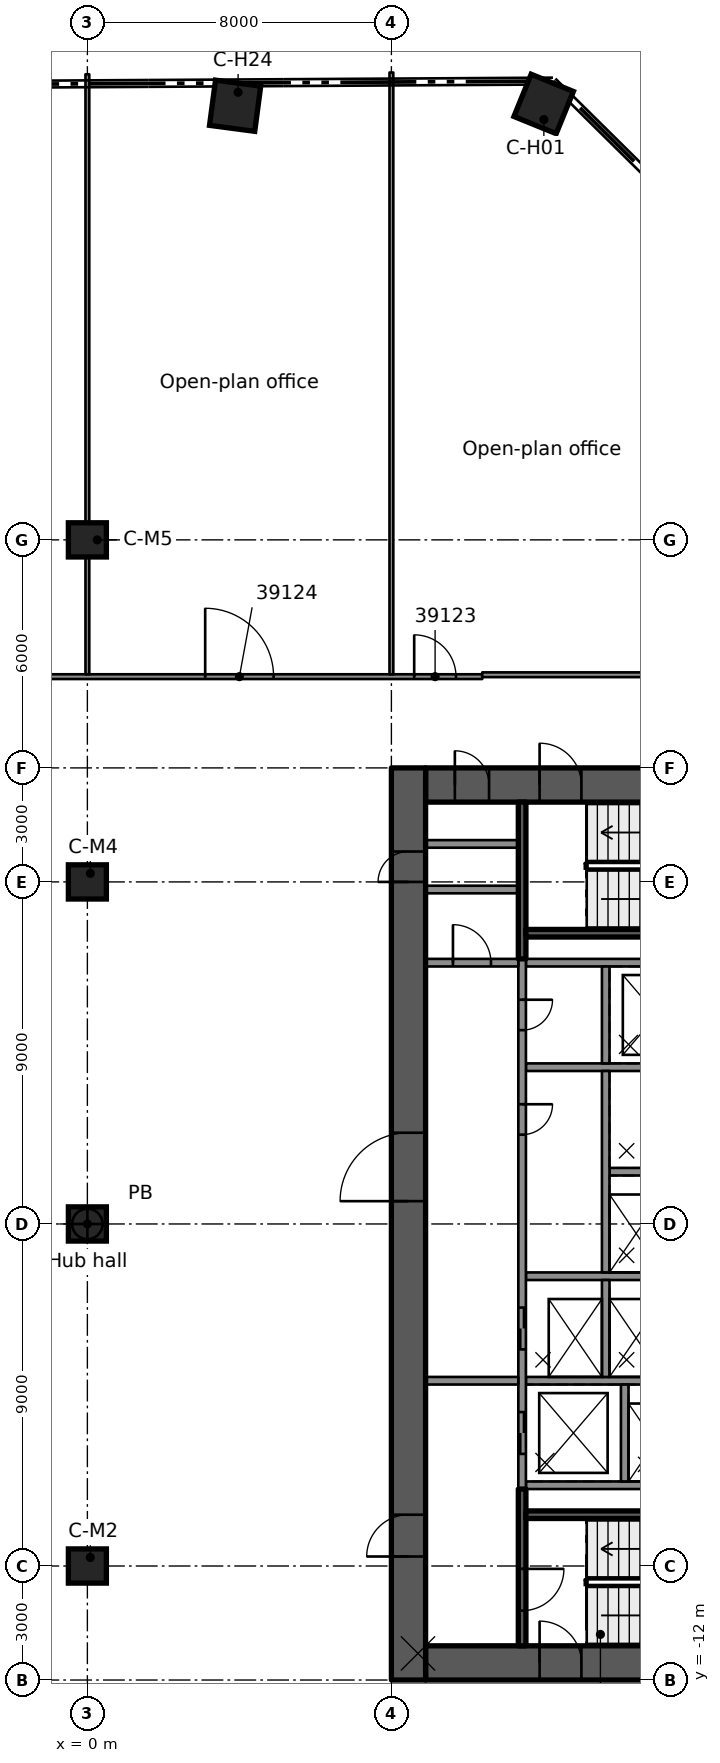
"""IFC4 building model, lengths in metres.
Left out: names, types, materials, properties, quantities, classifications, styles, units other than length and angle.
Written with IfcOpenShell. Run it as: python <this file> out.ifc"""

import sys

from ifc_helpers import new_model, si_unit, direction, frame, frame_2d, origin, origin_2d, place, context, subcontext, project, spatial, rectangle, extrude, element, fill, save


model = new_model("IFC4")
c1 = context("Model", 3, precision=1e-05, world=origin(), true_north=direction((0.0, 1.0)))
c2 = subcontext(c1, "Body", "Model", "MODEL_VIEW")
j1 = project(units=[si_unit("LENGTHUNIT", "METRE"), si_unit("PLANEANGLEUNIT", "RADIAN")], contexts=[c1])
p1 = place(None, origin())
s1 = spatial("IfcSite", under=j1, at=p1, CompositionType="ELEMENT")
p2 = place(p1, origin())
s2 = spatial("IfcBuilding", under=s1, at=p2, CompositionType="ELEMENT")
p3 = place(p2, frame((0.0, 0.0, 192.1)))
s3 = spatial("IfcBuildingStorey", under=s2, at=p3, CompositionType="ELEMENT", Elevation=192.1)
p4 = place(p3, frame((8.9, 11.55, 0.0), z_axis=(0.0, 0.0, 1.0), x_axis=(1.0, 0.0, 0.0)))
e1 = element("IfcWall", 1, at=p4, inside=s3, PredefinedType="SHEAR", context=c2, shape_type="SweptSolid", body=[
    extrude(rectangle(XDim=9.2, YDim=0.9, at=frame_2d((4.6, 0.0))), origin(), (0.0, 0.0, 1.0), 3.5),
])
p5 = place(p4, frame((3.0, 0.0, 0.0)))
e2 = element("IfcOpeningElement", 2, at=p5, cuts=e1, PredefinedType="OPENING", context=c2, shape_type="SweptSolid", body=[
    extrude(rectangle(XDim=1.1, YDim=2.1, at=frame_2d((0.55, 1.05))), frame((0.0, 0.46, 0.0), z_axis=(0.0, -1.0, 0.0), x_axis=(1.0, 0.0, 0.0)), (0.0, 0.0, 1.0), 0.92),
])
p6 = place(p4, frame((0.77, 0.0, 0.0)))
e3 = element("IfcOpeningElement", 3, at=p6, cuts=e1, PredefinedType="OPENING", context=c2, shape_type="SweptSolid", body=[
    extrude(rectangle(XDim=0.9, YDim=2.1, at=frame_2d((0.45, 1.05))), frame((0.0, 0.46, 0.0), z_axis=(0.0, -1.0, 0.0), x_axis=(1.0, 0.0, 0.0)), (0.0, 0.0, 1.0), 0.92),
])
p7 = place(p3, frame((8.9, -11.55, 0.0), z_axis=(0.0, 0.0, 1.0), x_axis=(1.0, 0.0, 0.0)))
e4 = element("IfcWall", 4, at=p7, inside=s3, PredefinedType="SHEAR", context=c2, shape_type="SweptSolid", body=[
    extrude(rectangle(XDim=9.2, YDim=0.9, at=frame_2d((4.6, 0.0))), origin(), (0.0, 0.0, 1.0), 3.5),
])
p8 = place(p7, frame((3.0, 0.0, 0.0)))
e5 = element("IfcOpeningElement", 5, at=p8, cuts=e4, PredefinedType="OPENING", context=c2, shape_type="SweptSolid", body=[
    extrude(rectangle(XDim=1.1, YDim=2.1, at=frame_2d((0.55, 1.05))), frame((0.0, 0.46, 0.0), z_axis=(0.0, -1.0, 0.0), x_axis=(1.0, 0.0, 0.0)), (0.0, 0.0, 1.0), 0.92),
])
p9 = place(p3, frame((8.45, -12.0, 0.0), z_axis=(0.0, 0.0, 1.0), x_axis=(0.0, 1.0, 0.0)))
e6 = element("IfcWall", 6, at=p9, inside=s3, PredefinedType="SHEAR", context=c2, shape_type="SweptSolid", body=[
    extrude(rectangle(XDim=24.0, YDim=0.9, at=frame_2d((12.0, 0.0))), origin(), (0.0, 0.0, 1.0), 3.5),
])
p10 = place(p9, frame((12.6, 0.0, 0.0)))
e7 = element("IfcOpeningElement", 7, at=p10, cuts=e6, PredefinedType="OPENING", context=c2, shape_type="SweptSolid", body=[
    extrude(rectangle(XDim=1.8, YDim=2.1, at=frame_2d((0.9, 1.05))), frame((0.0, 0.46, 0.0), z_axis=(0.0, -1.0, 0.0), x_axis=(1.0, 0.0, 0.0)), (0.0, 0.0, 1.0), 0.92),
])
p11 = place(p9, frame((3.25, 0.0, 0.0)))
e8 = element("IfcOpeningElement", 8, at=p11, cuts=e6, PredefinedType="OPENING", context=c2, shape_type="SweptSolid", body=[
    extrude(rectangle(XDim=1.1, YDim=2.1, at=frame_2d((0.55, 1.05))), frame((0.0, 0.46, 0.0), z_axis=(0.0, -1.0, 0.0), x_axis=(1.0, 0.0, 0.0)), (0.0, 0.0, 1.0), 0.92),
])
p12 = place(p9, frame((21.0, 0.0, 0.0)))
e9 = element("IfcOpeningElement", 9, at=p12, cuts=e6, PredefinedType="OPENING", context=c2, shape_type="SweptSolid", body=[
    extrude(rectangle(XDim=0.8, YDim=2.1, at=frame_2d((0.4, 1.05))), frame((0.0, 0.46, 0.0), z_axis=(0.0, -1.0, 0.0), x_axis=(1.0, 0.0, 0.0)), (0.0, 0.0, 1.0), 0.92),
])
for number, where, z_axis, x_axis in (
    (10, (12.007, 29.47, 0.0), (0.0, 0.0, 1.0), (0.377, 0.926, 0.0)),
    (11, (3.888, 29.423, 0.0), (0.0, 0.0, 1.0), (0.131, 0.991, 0.0)),
):
    element("IfcColumn", number, at=place(p3, frame(where, z_axis=z_axis, x_axis=x_axis)), inside=s3, PredefinedType="COLUMN", context=c2, shape_type="SweptSolid", body=[
        extrude(rectangle(XDim=1.2, YDim=1.2, at=origin_2d()), origin(), (0.0, 0.0, 1.0), 3.5),
    ])
for number, where, z_axis, x_axis in (
    (12, (0.0, -9.0, 0.0), (0.0, 0.0, 1.0), (1.0, 0.0, 0.0)),
    (13, (0.0, 0.0, 0.0), (0.0, 0.0, 1.0), (1.0, 0.0, 0.0)),
    (14, (0.0, 9.0, 0.0), (0.0, 0.0, 1.0), (1.0, 0.0, 0.0)),
    (15, (0.0, 18.0, 0.0), (0.0, 0.0, 1.0), (1.0, 0.0, 0.0)),
):
    element("IfcColumn", number, at=place(p3, frame(where, z_axis=z_axis, x_axis=x_axis)), inside=s3, PredefinedType="COLUMN", context=c2, shape_type="SweptSolid", body=[
        extrude(rectangle(XDim=1.0, YDim=0.9, at=origin_2d()), origin(), (0.0, 0.0, 1.0), 3.5),
    ])
for number, where, z_axis, x_axis in (
    (16, (11.54, -6.875, 0.0), (0.0, 0.0, 1.0), (1.0, 0.0, 0.0)),
    (17, (11.54, 6.875, 0.0), (0.0, 0.0, 1.0), (1.0, 0.0, 0.0)),
):
    element("IfcWall", number, at=place(p3, frame(where, z_axis=z_axis, x_axis=x_axis)), inside=s3, PredefinedType="SOLIDWALL", context=c2, shape_type="SweptSolid", body=[
        extrude(rectangle(XDim=6.56, YDim=0.2, at=frame_2d((3.28, 0.0))), origin(), (0.0, 0.0, 1.0), 3.08),
    ])
p13 = place(p3, frame((11.54, 4.125, 0.0), z_axis=(0.0, 0.0, 1.0), x_axis=(1.0, 0.0, 0.0)))
e18 = element("IfcWall", 18, at=p13, inside=s3, PredefinedType="SOLIDWALL", context=c2, shape_type="SweptSolid", body=[
    extrude(rectangle(XDim=4.7, YDim=0.2, at=frame_2d((2.35, 0.0))), origin(), (0.0, 0.0, 1.0), 3.08),
])
p14 = place(p3, frame((13.74, 1.375, 0.0), z_axis=(0.0, 0.0, 1.0), x_axis=(1.0, 0.0, 0.0)))
e19 = element("IfcWall", 19, at=p14, inside=s3, PredefinedType="SOLIDWALL", context=c2, shape_type="SweptSolid", body=[
    extrude(rectangle(XDim=2.0, YDim=0.2, at=frame_2d((1.0, 0.0))), origin(), (0.0, 0.0, 1.0), 3.08),
])
p15 = place(p3, frame((11.54, -1.375, 0.0), z_axis=(0.0, 0.0, 1.0), x_axis=(1.0, 0.0, 0.0)))
e20 = element("IfcWall", 20, at=p15, inside=s3, PredefinedType="SOLIDWALL", context=c2, shape_type="SweptSolid", body=[
    extrude(rectangle(XDim=4.2, YDim=0.2, at=frame_2d((2.1, 0.0))), origin(), (0.0, 0.0, 1.0), 3.08),
])
p16 = place(p3, frame((11.54, -4.125, 0.0), z_axis=(0.0, 0.0, 1.0), x_axis=(1.0, 0.0, 0.0)))
e21 = element("IfcWall", 21, at=p16, inside=s3, PredefinedType="SOLIDWALL", context=c2, shape_type="SweptSolid", body=[
    extrude(rectangle(XDim=4.7, YDim=0.2, at=frame_2d((2.35, 0.0))), origin(), (0.0, 0.0, 1.0), 3.08),
])
p17 = place(p3, frame((11.44, 6.975, 0.0), z_axis=(0.0, 0.0, 1.0), x_axis=(0.0, -1.0, 0.0)))
e22 = element("IfcWall", 22, at=p17, inside=s3, PredefinedType="SOLIDWALL", context=c2, shape_type="SweptSolid", body=[
    extrude(rectangle(XDim=13.95, YDim=0.2, at=frame_2d((6.975, 0.0))), origin(), (0.0, 0.0, 1.0), 3.08),
])
p18 = place(p17, frame((9.175, 0.0, 0.0)))
e23 = element("IfcOpeningElement", 23, at=p18, cuts=e22, PredefinedType="OPENING", context=c2, shape_type="SweptSolid", body=[
    extrude(rectangle(XDim=1.1, YDim=2.1, at=frame_2d((0.55, 1.05))), frame((0.0, 0.11, 0.0), z_axis=(0.0, -1.0, 0.0), x_axis=(1.0, 0.0, 0.0)), (0.0, 0.0, 1.0), 0.22),
])
p19 = place(p17, frame((11.925, 0.0, 0.0)))
e24 = element("IfcOpeningElement", 24, at=p19, cuts=e22, PredefinedType="OPENING", context=c2, shape_type="SweptSolid", body=[
    extrude(rectangle(XDim=1.1, YDim=2.1, at=frame_2d((0.55, 1.05))), frame((0.0, 0.11, 0.0), z_axis=(0.0, -1.0, 0.0), x_axis=(1.0, 0.0, 0.0)), (0.0, 0.0, 1.0), 0.22),
])
p20 = place(p17, frame((1.075, 0.0, 0.0)))
e25 = element("IfcOpeningElement", 25, at=p20, cuts=e22, PredefinedType="OPENING", context=c2, shape_type="SweptSolid", body=[
    extrude(rectangle(XDim=0.8, YDim=2.1, at=frame_2d((0.4, 1.05))), frame((0.0, 0.11, 0.0), z_axis=(0.0, -1.0, 0.0), x_axis=(1.0, 0.0, 0.0)), (0.0, 0.0, 1.0), 0.22),
])
p21 = place(p17, frame((3.825, 0.0, 0.0)))
e26 = element("IfcOpeningElement", 26, at=p21, cuts=e22, PredefinedType="OPENING", context=c2, shape_type="SweptSolid", body=[
    extrude(rectangle(XDim=0.8, YDim=2.1, at=frame_2d((0.4, 1.05))), frame((0.0, 0.11, 0.0), z_axis=(0.0, -1.0, 0.0), x_axis=(1.0, 0.0, 0.0)), (0.0, 0.0, 1.0), 0.22),
])
p22 = place(p3, frame((13.64, 6.775, 0.0), z_axis=(0.0, 0.0, 1.0), x_axis=(0.0, -1.0, 0.0)))
e27 = element("IfcWall", 27, at=p22, inside=s3, PredefinedType="SOLIDWALL", context=c2, shape_type="SweptSolid", body=[
    extrude(rectangle(XDim=2.55, YDim=0.2, at=frame_2d((1.275, 0.0))), origin(), (0.0, 0.0, 1.0), 3.08),
])
p23 = place(p3, frame((13.64, 4.025, 0.0), z_axis=(0.0, 0.0, 1.0), x_axis=(0.0, -1.0, 0.0)))
e28 = element("IfcWall", 28, at=p23, inside=s3, PredefinedType="SOLIDWALL", context=c2, shape_type="SweptSolid", body=[
    extrude(rectangle(XDim=5.3, YDim=0.2, at=frame_2d((2.65, 0.0))), origin(), (0.0, 0.0, 1.0), 3.08),
])
for number, where, z_axis, x_axis in (
    (29, (13.64, -1.475, 0.0), (0.0, 0.0, 1.0), (0.0, -1.0, 0.0)),
    (30, (14.14, -4.225, 0.0), (0.0, 0.0, 1.0), (0.0, -1.0, 0.0)),
):
    element("IfcWall", number, at=place(p3, frame(where, z_axis=z_axis, x_axis=x_axis)), inside=s3, PredefinedType="SOLIDWALL", context=c2, shape_type="SweptSolid", body=[
        extrude(rectangle(XDim=2.55, YDim=0.2, at=frame_2d((1.275, 0.0))), origin(), (0.0, 0.0, 1.0), 3.08),
    ])
p24 = place(p3, frame((11.44, -6.975, 0.0), z_axis=(0.0, 0.0, 1.0), x_axis=(0.0, -1.0, 0.0)))
e31 = element("IfcWall", 31, at=p24, inside=s3, PredefinedType="SOLIDWALL", context=c2, shape_type="SweptSolid", body=[
    extrude(rectangle(XDim=4.125, YDim=0.2, at=frame_2d((2.062, 0.0))), origin(), (0.0, 0.0, 1.0), 3.08),
])
p25 = place(p24, frame((2.1, 0.0, 0.0)))
e32 = element("IfcOpeningElement", 32, at=p25, cuts=e31, PredefinedType="OPENING", context=c2, shape_type="SweptSolid", body=[
    extrude(rectangle(XDim=1.1, YDim=2.1, at=frame_2d((0.55, 1.05))), frame((0.0, 0.11, 0.0), z_axis=(0.0, -1.0, 0.0), x_axis=(1.0, 0.0, 0.0)), (0.0, 0.0, 1.0), 0.22),
])
p26 = place(p3, frame((11.54, -7.65, 0.0), z_axis=(0.0, 0.0, 1.0), x_axis=(1.0, 0.0, 0.0)))
e33 = element("IfcWall", 33, at=p26, inside=s3, PredefinedType="SOLIDWALL", context=c2, shape_type="SweptSolid", body=[
    extrude(rectangle(XDim=6.56, YDim=0.2, at=frame_2d((3.28, 0.0))), origin(), (0.0, 0.0, 1.0), 3.08),
])
p27 = place(p3, frame((11.44, 11.1, 0.0), z_axis=(0.0, 0.0, 1.0), x_axis=(0.0, -1.0, 0.0)))
e34 = element("IfcWall", 34, at=p27, inside=s3, PredefinedType="SOLIDWALL", context=c2, shape_type="SweptSolid", body=[
    extrude(rectangle(XDim=4.125, YDim=0.2, at=frame_2d((2.062, 0.0))), origin(), (0.0, 0.0, 1.0), 3.08),
])
p28 = place(p3, frame((11.54, 7.65, 0.0), z_axis=(0.0, 0.0, 1.0), x_axis=(1.0, 0.0, 0.0)))
e35 = element("IfcWall", 35, at=p28, inside=s3, PredefinedType="SOLIDWALL", context=c2, shape_type="SweptSolid", body=[
    extrude(rectangle(XDim=6.56, YDim=0.2, at=frame_2d((3.28, 0.0))), origin(), (0.0, 0.0, 1.0), 3.08),
])
p29 = place(p3, frame((8.9, -4.125, 0.0), z_axis=(0.0, 0.0, 1.0), x_axis=(1.0, 0.0, 0.0)))
e36 = element("IfcWall", 36, at=p29, inside=s3, PredefinedType="PARTITIONING", context=c2, shape_type="SweptSolid", body=[
    extrude(rectangle(XDim=2.44, YDim=0.2, at=frame_2d((1.22, 0.0))), origin(), (0.0, 0.0, 1.0), 3.08),
])
p30 = place(p3, frame((8.9, 6.875, 0.0), z_axis=(0.0, 0.0, 1.0), x_axis=(1.0, 0.0, 0.0)))
e37 = element("IfcWall", 37, at=p30, inside=s3, PredefinedType="PARTITIONING", context=c2, shape_type="SweptSolid", body=[
    extrude(rectangle(XDim=2.44, YDim=0.2, at=frame_2d((1.22, 0.0))), origin(), (0.0, 0.0, 1.0), 3.08),
])
p31 = place(p30, frame((0.72, 0.0, 0.0)))
e38 = element("IfcOpeningElement", 38, at=p31, cuts=e37, PredefinedType="OPENING", context=c2, shape_type="SweptSolid", body=[
    extrude(rectangle(XDim=1.0, YDim=2.1, at=frame_2d((0.5, 1.05))), frame((0.0, 0.11, 0.0), z_axis=(0.0, -1.0, 0.0), x_axis=(1.0, 0.0, 0.0)), (0.0, 0.0, 1.0), 0.22),
])
for number, where, z_axis, x_axis in (
    (39, (8.9, 10.0, 0.0), (0.0, 0.0, 1.0), (1.0, 0.0, 0.0)),
    (40, (8.9, 8.8, 0.0), (0.0, 0.0, 1.0), (1.0, 0.0, 0.0)),
):
    element("IfcWall", number, at=place(p3, frame(where, z_axis=z_axis, x_axis=x_axis)), inside=s3, PredefinedType="PARTITIONING", context=c2, shape_type="SweptSolid", body=[
        extrude(rectangle(XDim=2.44, YDim=0.2, at=frame_2d((1.22, 0.0))), origin(), (0.0, 0.0, 1.0), 3.08),
    ])
p32 = place(p3, frame((-10.39, 14.401, 0.0), z_axis=(0.0, 0.0, 1.0), x_axis=(1.0, 0.0, 0.0)))
e41 = element("IfcWall", 41, at=p32, inside=s3, PredefinedType="PARTITIONING", context=c2, shape_type="SweptSolid", body=[
    extrude(rectangle(XDim=20.781, YDim=0.125, at=frame_2d((10.391, 0.0))), origin(), (0.0, 0.0, 1.0), 3.06),
])
p33 = place(p32, frame((18.99, 0.0, 0.0)))
e42 = element("IfcOpeningElement", 42, at=p33, cuts=e41, PredefinedType="OPENING", context=c2, shape_type="SweptSolid", body=[
    extrude(rectangle(XDim=1.1, YDim=2.1, at=frame_2d((0.55, 1.05))), frame((0.0, 0.073, 0.0), z_axis=(0.0, -1.0, 0.0), x_axis=(1.0, 0.0, 0.0)), (0.0, 0.0, 1.0), 0.145),
])
p34 = place(p32, frame((13.49, 0.0, 0.0)))
e43 = element("IfcOpeningElement", 43, at=p34, cuts=e41, PredefinedType="OPENING", context=c2, shape_type="SweptSolid", body=[
    extrude(rectangle(XDim=1.8, YDim=2.1, at=frame_2d((0.9, 1.05))), frame((0.0, 0.073, 0.0), z_axis=(0.0, -1.0, 0.0), x_axis=(1.0, 0.0, 0.0)), (0.0, 0.0, 1.0), 0.145),
])
p35 = place(p32, frame((5.49, 0.0, 0.0)))
e44 = element("IfcOpeningElement", 44, at=p35, cuts=e41, PredefinedType="OPENING", context=c2, shape_type="SweptSolid", body=[
    extrude(rectangle(XDim=1.8, YDim=2.1, at=frame_2d((0.9, 1.05))), frame((0.0, 0.073, 0.0), z_axis=(0.0, -1.0, 0.0), x_axis=(1.0, 0.0, 0.0)), (0.0, 0.0, 1.0), 0.145),
])
p36 = place(p3, frame((10.391, 14.451, 0.0), z_axis=(0.0, 0.0, 1.0), x_axis=(1.0, 0.0, 0.0)))
e45 = element("IfcWall", 45, at=p36, inside=s3, PredefinedType="PARTITIONING", context=c2, shape_type="SweptSolid", body=[
    extrude(rectangle(XDim=10.996, YDim=0.125, at=frame_2d((5.498, 0.0))), origin(), (0.0, 0.0, 1.0), 3.06),
])
p37 = place(p36, frame((7.38, 0.0, 0.0)))
e46 = element("IfcOpeningElement", 46, at=p37, cuts=e45, PredefinedType="OPENING", context=c2, shape_type="SweptSolid", body=[
    extrude(rectangle(XDim=1.8, YDim=2.1, at=frame_2d((0.9, 1.05))), frame((0.0, 0.073, 0.0), z_axis=(0.0, -1.0, 0.0), x_axis=(1.0, 0.0, 0.0)), (0.0, 0.0, 1.0), 0.145),
])
p38 = place(p3, frame((8.0, 14.463, 0.0), z_axis=(0.0, 0.0, 1.0), x_axis=(0.0, 1.0, 0.0)))
e47 = element("IfcWall", 47, at=p38, inside=s3, PredefinedType="PARTITIONING", context=c2, shape_type="SweptSolid", body=[
    extrude(rectangle(XDim=15.834, YDim=0.1, at=frame_2d((7.917, 0.0))), origin(), (0.0, 0.0, 1.0), 3.06),
])
p39 = place(p3, frame((0.0, 14.463, 0.0), z_axis=(0.0, 0.0, 1.0), x_axis=(0.0, 1.0, 0.0)))
e48 = element("IfcWall", 48, at=p39, inside=s3, PredefinedType="PARTITIONING", context=c2, shape_type="SweptSolid", body=[
    extrude(rectangle(XDim=15.788, YDim=0.1, at=frame_2d((7.894, 0.0))), origin(), (0.0, 0.0, 1.0), 3.06),
])
p40 = place(p18, origin())
e49 = element("IfcDoor", 49, at=p40, inside=s3, OperationType="DOUBLE_DOOR_SLIDING", PredefinedType="DOOR", context=c2, shape_type="SweptSolid", body=[
    extrude(rectangle(XDim=1.1, YDim=2.1, at=frame_2d((0.55, 1.05))), frame((0.0, 0.025, 0.0), z_axis=(0.0, -1.0, 0.0), x_axis=(1.0, 0.0, 0.0)), (0.0, 0.0, 1.0), 0.05),
])
fill(e23, e49)
p41 = place(p19, origin())
e50 = element("IfcDoor", 50, at=p41, inside=s3, OperationType="DOUBLE_DOOR_SLIDING", PredefinedType="DOOR", context=c2, shape_type="SweptSolid", body=[
    extrude(rectangle(XDim=1.1, YDim=2.1, at=frame_2d((0.55, 1.05))), frame((0.0, 0.025, 0.0), z_axis=(0.0, -1.0, 0.0), x_axis=(1.0, 0.0, 0.0)), (0.0, 0.0, 1.0), 0.05),
])
fill(e24, e50)
p42 = place(p20, origin())
e51 = element("IfcDoor", 51, at=p42, inside=s3, OperationType="SINGLE_SWING_LEFT", PredefinedType="DOOR", context=c2, shape_type="SweptSolid", body=[
    extrude(rectangle(XDim=0.8, YDim=2.1, at=frame_2d((0.4, 1.05))), frame((0.0, 0.025, 0.0), z_axis=(0.0, -1.0, 0.0), x_axis=(1.0, 0.0, 0.0)), (0.0, 0.0, 1.0), 0.05),
])
fill(e25, e51)
p43 = place(p21, origin())
e52 = element("IfcDoor", 52, at=p43, inside=s3, OperationType="SINGLE_SWING_LEFT", PredefinedType="DOOR", context=c2, shape_type="SweptSolid", body=[
    extrude(rectangle(XDim=0.8, YDim=2.1, at=frame_2d((0.4, 1.05))), frame((0.0, 0.025, 0.0), z_axis=(0.0, -1.0, 0.0), x_axis=(1.0, 0.0, 0.0)), (0.0, 0.0, 1.0), 0.05),
])
fill(e26, e52)
p44 = place(p10, origin())
e53 = element("IfcDoor", 53, at=p44, inside=s3, OperationType="SINGLE_SWING_RIGHT", PredefinedType="DOOR", context=c2, shape_type="SweptSolid", body=[
    extrude(rectangle(XDim=1.8, YDim=2.1, at=frame_2d((0.9, 1.05))), frame((0.0, 0.025, 0.0), z_axis=(0.0, -1.0, 0.0), x_axis=(1.0, 0.0, 0.0)), (0.0, 0.0, 1.0), 0.05),
])
fill(e7, e53)
p45 = place(p11, origin())
e54 = element("IfcDoor", 54, at=p45, inside=s3, OperationType="SINGLE_SWING_LEFT", PredefinedType="DOOR", context=c2, shape_type="SweptSolid", body=[
    extrude(rectangle(XDim=1.1, YDim=2.1, at=frame_2d((0.55, 1.05))), frame((0.0, 0.025, 0.0), z_axis=(0.0, -1.0, 0.0), x_axis=(1.0, 0.0, 0.0)), (0.0, 0.0, 1.0), 0.05),
])
fill(e8, e54)
p46 = place(p8, origin())
e55 = element("IfcDoor", 55, at=p46, inside=s3, OperationType="SINGLE_SWING_LEFT", PredefinedType="DOOR", context=c2, shape_type="SweptSolid", body=[
    extrude(rectangle(XDim=1.1, YDim=2.1, at=frame_2d((0.55, 1.05))), frame((0.0, 0.025, 0.0), z_axis=(0.0, -1.0, 0.0), x_axis=(1.0, 0.0, 0.0)), (0.0, 0.0, 1.0), 0.05),
])
fill(e5, e55)
p47 = place(p5, origin())
e56 = element("IfcDoor", 56, at=p47, inside=s3, OperationType="SINGLE_SWING_LEFT", PredefinedType="DOOR", context=c2, shape_type="SweptSolid", body=[
    extrude(rectangle(XDim=1.1, YDim=2.1, at=frame_2d((0.55, 1.05))), frame((0.0, 0.025, 0.0), z_axis=(0.0, -1.0, 0.0), x_axis=(1.0, 0.0, 0.0)), (0.0, 0.0, 1.0), 0.05),
])
fill(e2, e56)
p48 = place(p25, origin())
e57 = element("IfcDoor", 57, at=p48, inside=s3, OperationType="SINGLE_SWING_RIGHT", PredefinedType="DOOR", context=c2, shape_type="SweptSolid", body=[
    extrude(rectangle(XDim=1.1, YDim=2.1, at=frame_2d((0.55, 1.05))), frame((0.0, 0.025, 0.0), z_axis=(0.0, -1.0, 0.0), x_axis=(1.0, 0.0, 0.0)), (0.0, 0.0, 1.0), 0.05),
])
fill(e32, e57)
p49 = place(p6, origin())
e58 = element("IfcDoor", 58, at=p49, inside=s3, OperationType="SINGLE_SWING_LEFT", PredefinedType="DOOR", context=c2, shape_type="SweptSolid", body=[
    extrude(rectangle(XDim=0.9, YDim=2.1, at=frame_2d((0.45, 1.05))), frame((0.0, 0.025, 0.0), z_axis=(0.0, -1.0, 0.0), x_axis=(1.0, 0.0, 0.0)), (0.0, 0.0, 1.0), 0.05),
])
fill(e3, e58)
p50 = place(p12, origin())
e59 = element("IfcDoor", 59, at=p50, inside=s3, OperationType="SINGLE_SWING_RIGHT", PredefinedType="DOOR", context=c2, shape_type="SweptSolid", body=[
    extrude(rectangle(XDim=0.8, YDim=2.1, at=frame_2d((0.4, 1.05))), frame((0.0, 0.025, 0.0), z_axis=(0.0, -1.0, 0.0), x_axis=(1.0, 0.0, 0.0)), (0.0, 0.0, 1.0), 0.05),
])
fill(e9, e59)
p51 = place(p31, origin())
e60 = element("IfcDoor", 60, at=p51, inside=s3, OperationType="SINGLE_SWING_RIGHT", PredefinedType="DOOR", context=c2, shape_type="SweptSolid", body=[
    extrude(rectangle(XDim=1.0, YDim=2.1, at=frame_2d((0.5, 1.05))), frame((0.0, 0.025, 0.0), z_axis=(0.0, -1.0, 0.0), x_axis=(1.0, 0.0, 0.0)), (0.0, 0.0, 1.0), 0.05),
])
fill(e38, e60)
p52 = place(p33, origin())
e61 = element("IfcDoor", 61, at=p52, inside=s3, OperationType="SINGLE_SWING_RIGHT", PredefinedType="DOOR", context=c2, shape_type="SweptSolid", body=[
    extrude(rectangle(XDim=1.1, YDim=2.1, at=frame_2d((0.55, 1.05))), frame((0.0, 0.025, 0.0), z_axis=(0.0, -1.0, 0.0), x_axis=(1.0, 0.0, 0.0)), (0.0, 0.0, 1.0), 0.05),
])
fill(e42, e61)
p53 = place(p34, origin())
e62 = element("IfcDoor", 62, at=p53, inside=s3, OperationType="DOUBLE_DOOR_SINGLE_SWING", PredefinedType="DOOR", context=c2, shape_type="SweptSolid", body=[
    extrude(rectangle(XDim=1.8, YDim=2.1, at=frame_2d((0.9, 1.05))), frame((0.0, 0.025, 0.0), z_axis=(0.0, -1.0, 0.0), x_axis=(1.0, 0.0, 0.0)), (0.0, 0.0, 1.0), 0.05),
])
fill(e43, e62)
save(model, sys.argv[1])
